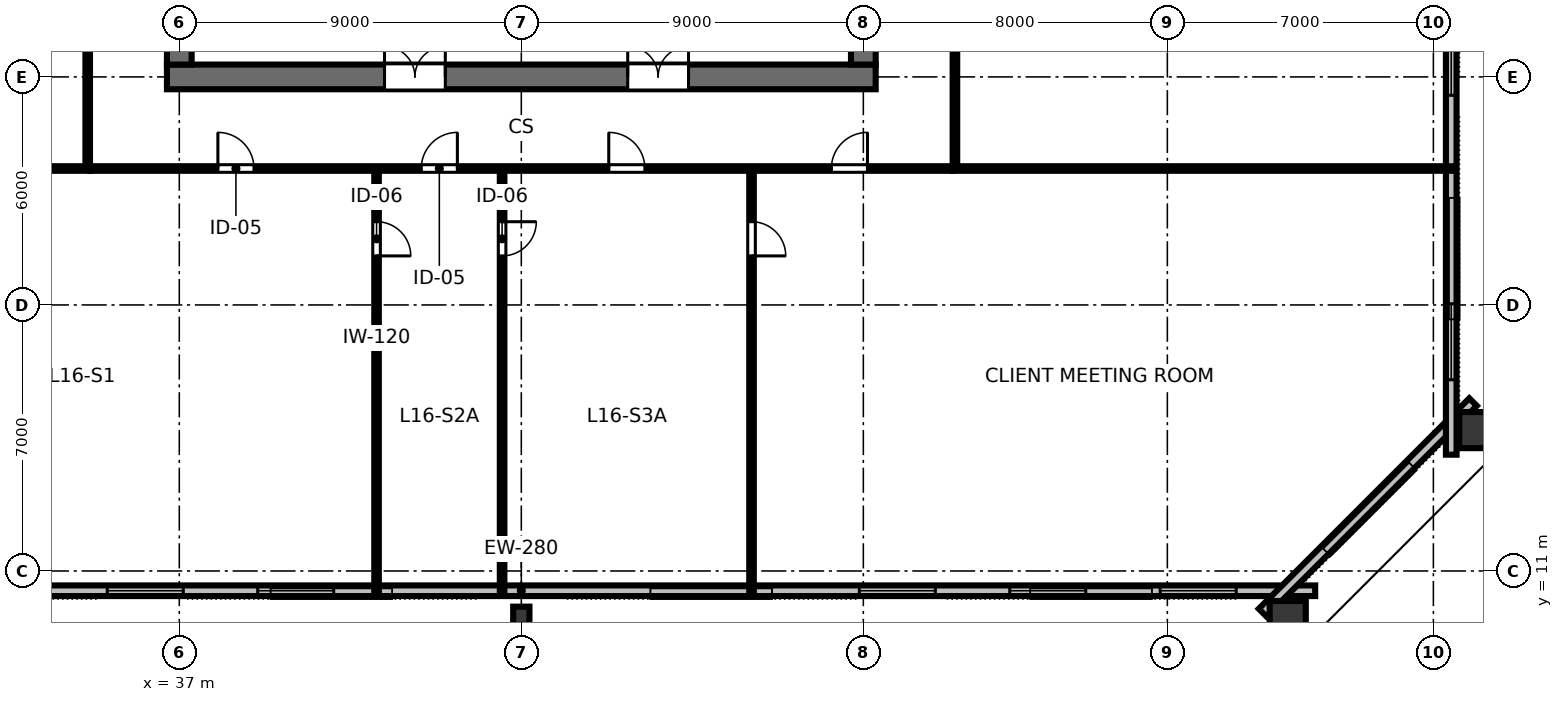
"""IFC4 building model, lengths in metres.
Left out: names, types, materials, properties, quantities, classifications, styles, units other than length and angle.
Written with IfcOpenShell. Run it as: python <this file> out.ifc"""

import sys

from ifc_helpers import new_model, si_unit, direction, frame, frame_2d, origin, origin_2d, place, context, subcontext, project, spatial, rectangle, hollow_rectangle, i_section, extrude, element, fill, save


model = new_model("IFC4")
c1 = context("Model", 3, precision=1e-05, world=origin(), true_north=direction((0.0, 1.0)))
c2 = subcontext(c1, "Body", "Model", "MODEL_VIEW")
j1 = project(units=[si_unit("LENGTHUNIT", "METRE"), si_unit("PLANEANGLEUNIT", "RADIAN")], contexts=[c1])
p1 = place(None, origin())
s1 = spatial("IfcSite", under=j1, at=p1, CompositionType="ELEMENT")
p2 = place(p1, origin())
s2 = spatial("IfcBuilding", under=s1, at=p2, CompositionType="ELEMENT")
p3 = place(p2, frame((0.0, 0.0, 64.0)))
s3 = spatial("IfcBuildingStorey", under=s2, at=p3, CompositionType="ELEMENT", Elevation=64.0)
p4 = place(p3, frame((36.675, 24.0, 0.0), z_axis=(0.0, 0.0, 1.0), x_axis=(1.0, 0.0, 0.0)))
e1 = element("IfcWall", 1, at=p4, inside=s3, PredefinedType="SHEAR", context=c2, shape_type="SweptSolid", body=[
    extrude(rectangle(XDim=18.65, YDim=0.65, at=frame_2d((9.325, 0.0))), origin(), (0.0, 0.0, 1.0), 3.36),
])
p5 = place(p4, frame((5.725, 0.0, 0.0)))
e2 = element("IfcOpeningElement", 2, at=p5, cuts=e1, PredefinedType="OPENING", context=c2, shape_type="SweptSolid", body=[
    extrude(rectangle(XDim=1.6, YDim=2.15, at=frame_2d((0.8, 1.075))), frame((0.0, 0.335, 0.0), z_axis=(0.0, -1.0, 0.0), x_axis=(1.0, 0.0, 0.0)), (0.0, 0.0, 1.0), 0.67),
])
p6 = place(p4, frame((12.125, 0.0, 0.0)))
e3 = element("IfcOpeningElement", 3, at=p6, cuts=e1, PredefinedType="OPENING", context=c2, shape_type="SweptSolid", body=[
    extrude(rectangle(XDim=1.6, YDim=2.15, at=frame_2d((0.8, 1.075))), frame((0.0, 0.335, 0.0), z_axis=(0.0, -1.0, 0.0), x_axis=(1.0, 0.0, 0.0)), (0.0, 0.0, 1.0), 0.67),
])
p7 = place(p3, frame((37.0, 24.325, 0.0), z_axis=(0.0, 0.0, 1.0), x_axis=(0.0, 1.0, 0.0)))
e4 = element("IfcWall", 4, at=p7, inside=s3, PredefinedType="SHEAR", context=c2, shape_type="SweptSolid", body=[
    extrude(rectangle(XDim=15.35, YDim=0.65, at=frame_2d((7.675, 0.0))), origin(), (0.0, 0.0, 1.0), 3.36),
])
p8 = place(p7, frame((5.2, 0.0, 0.0)))
e5 = element("IfcOpeningElement", 5, at=p8, cuts=e4, PredefinedType="OPENING", context=c2, shape_type="SweptSolid", body=[
    extrude(rectangle(XDim=1.15, YDim=2.15, at=frame_2d((0.575, 1.075))), frame((0.0, 0.335, 0.0), z_axis=(0.0, -1.0, 0.0), x_axis=(1.0, 0.0, 0.0)), (0.0, 0.0, 1.0), 0.67),
])
p9 = place(p3, frame((55.0, 24.325, 0.0), z_axis=(0.0, 0.0, 1.0), x_axis=(0.0, 1.0, 0.0)))
e6 = element("IfcWall", 6, at=p9, inside=s3, PredefinedType="SHEAR", context=c2, shape_type="SweptSolid", body=[
    extrude(rectangle(XDim=15.35, YDim=0.65, at=frame_2d((7.675, 0.0))), origin(), (0.0, 0.0, 1.0), 3.36),
])
p10 = place(p9, frame((5.2, 0.0, 0.0)))
e7 = element("IfcOpeningElement", 7, at=p10, cuts=e6, PredefinedType="OPENING", context=c2, shape_type="SweptSolid", body=[
    extrude(rectangle(XDim=1.15, YDim=2.15, at=frame_2d((0.575, 1.075))), frame((0.0, 0.335, 0.0), z_axis=(0.0, -1.0, 0.0), x_axis=(1.0, 0.0, 0.0)), (0.0, 0.0, 1.0), 0.67),
])
p11 = place(p3, frame((46.0, 9.82, 0.0), z_axis=(0.0, 0.0, 1.0), x_axis=(1.0, 0.0, 0.0)))
e8 = element("IfcColumn", 8, at=p11, inside=s3, PredefinedType="COLUMN", context=c2, shape_type="SweptSolid", body=[
    extrude(i_section(OverallWidth=0.428, OverallDepth=0.483, WebThickness=0.051, FlangeThickness=0.082, FilletRadius=0.025, at=origin_2d()), origin(), (0.0, 0.0, 1.0), 3.358),
])
for number, where, z_axis, x_axis in (
    (9, (66.168, 9.635, 0.0), (0.0, 0.0, 1.0), (1.0, 0.0, 0.0)),
    (10, (71.256, 14.707, 0.0), (0.0, 0.0, 1.0), (0.0, 1.0, 0.0)),
):
    element("IfcColumn", number, at=place(p3, frame(where, z_axis=z_axis, x_axis=x_axis)), inside=s3, PredefinedType="COLUMN", context=c2, shape_type="SweptSolid", body=[
        extrude(hollow_rectangle(XDim=0.95, YDim=1.15, WallThickness=0.06, at=origin_2d()), origin(), (0.0, 0.0, 1.0), 3.358),
    ])
p12 = place(p3, frame((25.11, 10.48, 0.0), z_axis=(0.0, 0.0, 1.0), x_axis=(1.0, 0.0, 0.0)))
e11 = element("IfcWall", 11, at=p12, inside=s3, PredefinedType="STANDARD", context=c2, shape_type="SweptSolid", body=[
    extrude(rectangle(XDim=41.78, YDim=0.28, at=frame_2d((20.89, 0.0))), origin(), (0.0, 0.0, 1.0), 3.36),
])
p13 = place(p12, frame((2.079, 0.0, 0.8)))
e12 = element("IfcOpeningElement", 12, at=p13, cuts=e11, PredefinedType="OPENING", context=c2, shape_type="SweptSolid", body=[
    extrude(rectangle(XDim=2.0, YDim=1.95, at=frame_2d((1.0, 0.975))), frame((0.0, 0.15, 0.0), z_axis=(0.0, -1.0, 0.0), x_axis=(1.0, 0.0, 0.0)), (0.0, 0.0, 1.0), 0.3),
])
p14 = place(p12, frame((6.037, 0.0, 0.8)))
e13 = element("IfcOpeningElement", 13, at=p14, cuts=e11, PredefinedType="OPENING", context=c2, shape_type="SweptSolid", body=[
    extrude(rectangle(XDim=2.0, YDim=1.95, at=frame_2d((1.0, 0.975))), frame((0.0, 0.15, 0.0), z_axis=(0.0, -1.0, 0.0), x_axis=(1.0, 0.0, 0.0)), (0.0, 0.0, 1.0), 0.3),
])
p15 = place(p12, frame((9.995, 0.0, 0.8)))
e14 = element("IfcOpeningElement", 14, at=p15, cuts=e11, PredefinedType="OPENING", context=c2, shape_type="SweptSolid", body=[
    extrude(rectangle(XDim=2.0, YDim=1.95, at=frame_2d((1.0, 0.975))), frame((0.0, 0.15, 0.0), z_axis=(0.0, -1.0, 0.0), x_axis=(1.0, 0.0, 0.0)), (0.0, 0.0, 1.0), 0.3),
])
p16 = place(p12, frame((13.953, 0.0, 0.8)))
e15 = element("IfcOpeningElement", 15, at=p16, cuts=e11, PredefinedType="OPENING", context=c2, shape_type="SweptSolid", body=[
    extrude(rectangle(XDim=2.0, YDim=1.95, at=frame_2d((1.0, 0.975))), frame((0.0, 0.15, 0.0), z_axis=(0.0, -1.0, 0.0), x_axis=(1.0, 0.0, 0.0)), (0.0, 0.0, 1.0), 0.3),
])
p17 = place(p12, frame((29.785, 0.0, 0.8)))
e16 = element("IfcOpeningElement", 16, at=p17, cuts=e11, PredefinedType="OPENING", context=c2, shape_type="SweptSolid", body=[
    extrude(rectangle(XDim=2.0, YDim=1.95, at=frame_2d((1.0, 0.975))), frame((0.0, 0.15, 0.0), z_axis=(0.0, -1.0, 0.0), x_axis=(1.0, 0.0, 0.0)), (0.0, 0.0, 1.0), 0.3),
])
p18 = place(p12, frame((33.743, 0.0, 0.8)))
e17 = element("IfcOpeningElement", 17, at=p18, cuts=e11, PredefinedType="OPENING", context=c2, shape_type="SweptSolid", body=[
    extrude(rectangle(XDim=2.0, YDim=1.95, at=frame_2d((1.0, 0.975))), frame((0.0, 0.15, 0.0), z_axis=(0.0, -1.0, 0.0), x_axis=(1.0, 0.0, 0.0)), (0.0, 0.0, 1.0), 0.3),
])
p19 = place(p12, frame((37.701, 0.0, 0.8)))
e18 = element("IfcOpeningElement", 18, at=p19, cuts=e11, PredefinedType="OPENING", context=c2, shape_type="SweptSolid", body=[
    extrude(rectangle(XDim=2.0, YDim=1.95, at=frame_2d((1.0, 0.975))), frame((0.0, 0.15, 0.0), z_axis=(0.0, -1.0, 0.0), x_axis=(1.0, 0.0, 0.0)), (0.0, 0.0, 1.0), 0.3),
])
p20 = place(p3, frame((65.504, 9.906, 0.0), z_axis=(0.0, 0.0, 1.0), x_axis=(0.707106781187, 0.707106781187, 0.0)))
e19 = element("IfcWall", 19, at=p20, inside=s3, PredefinedType="STANDARD", context=c2, shape_type="SweptSolid", body=[
    extrude(rectangle(XDim=7.834, YDim=0.28, at=frame_2d((3.917, 0.0))), origin(), (0.0, 0.0, 1.0), 3.36),
])
p21 = place(p3, frame((70.47, 14.06, 0.0), z_axis=(0.0, 0.0, 1.0), x_axis=(0.0, 1.0, 0.0)))
e20 = element("IfcWall", 20, at=p21, inside=s3, PredefinedType="STANDARD", context=c2, shape_type="SweptSolid", body=[
    extrude(rectangle(XDim=35.88, YDim=0.28, at=frame_2d((17.94, 0.0))), origin(), (0.0, 0.0, 1.0), 3.36),
])
p22 = place(p21, frame((19.29, 0.0, 0.0)))
e21 = element("IfcOpeningElement", 21, at=p22, cuts=e20, PredefinedType="OPENING", context=c2, shape_type="SweptSolid", body=[
    extrude(rectangle(XDim=1.4, YDim=2.15, at=frame_2d((0.7, 1.075))), frame((0.0, 0.15, 0.0), z_axis=(0.0, -1.0, 0.0), x_axis=(1.0, 0.0, 0.0)), (0.0, 0.0, 1.0), 0.3),
])
p23 = place(p21, frame((1.971, 0.0, 0.8)))
e22 = element("IfcOpeningElement", 22, at=p23, cuts=e20, PredefinedType="OPENING", context=c2, shape_type="SweptSolid", body=[
    extrude(rectangle(XDim=2.0, YDim=1.95, at=frame_2d((1.0, 0.975))), frame((0.0, 0.15, 0.0), z_axis=(0.0, -1.0, 0.0), x_axis=(1.0, 0.0, 0.0)), (0.0, 0.0, 1.0), 0.3),
])
p24 = place(p21, frame((9.456, 0.0, 0.8)))
e23 = element("IfcOpeningElement", 23, at=p24, cuts=e20, PredefinedType="OPENING", context=c2, shape_type="SweptSolid", body=[
    extrude(rectangle(XDim=2.0, YDim=1.95, at=frame_2d((1.0, 0.975))), frame((0.0, 0.15, 0.0), z_axis=(0.0, -1.0, 0.0), x_axis=(1.0, 0.0, 0.0)), (0.0, 0.0, 1.0), 0.3),
])
p25 = place(p21, frame((24.424, 0.0, 0.8)))
e24 = element("IfcOpeningElement", 24, at=p25, cuts=e20, PredefinedType="OPENING", context=c2, shape_type="SweptSolid", body=[
    extrude(rectangle(XDim=2.0, YDim=1.95, at=frame_2d((1.0, 0.975))), frame((0.0, 0.15, 0.0), z_axis=(0.0, -1.0, 0.0), x_axis=(1.0, 0.0, 0.0)), (0.0, 0.0, 1.0), 0.3),
])
p26 = place(p21, frame((31.909, 0.0, 0.8)))
e25 = element("IfcOpeningElement", 25, at=p26, cuts=e20, PredefinedType="OPENING", context=c2, shape_type="SweptSolid", body=[
    extrude(rectangle(XDim=2.0, YDim=1.95, at=frame_2d((1.0, 0.975))), frame((0.0, 0.15, 0.0), z_axis=(0.0, -1.0, 0.0), x_axis=(1.0, 0.0, 0.0)), (0.0, 0.0, 1.0), 0.3),
])
p27 = place(p3, frame((42.191, 21.59, 0.0), z_axis=(0.0, 0.0, 1.0), x_axis=(0.0, -1.0, 0.0)))
e26 = element("IfcWall", 26, at=p27, inside=s3, PredefinedType="PARTITIONING", context=c2, shape_type="SweptSolid", body=[
    extrude(rectangle(XDim=11.11, YDim=0.12, at=frame_2d((5.555, 0.0))), origin(), (0.0, 0.0, 1.0), 2.64),
])
p28 = place(p27, frame((1.4, 0.0, 0.0)))
e27 = element("IfcOpeningElement", 27, at=p28, cuts=e26, PredefinedType="OPENING", context=c2, shape_type="SweptSolid", body=[
    extrude(rectangle(XDim=0.9, YDim=2.15, at=frame_2d((0.45, 1.075))), frame((0.0, 0.07, 0.0), z_axis=(0.0, -1.0, 0.0), x_axis=(1.0, 0.0, 0.0)), (0.0, 0.0, 1.0), 0.14),
])
p29 = place(p3, frame((45.494, 21.59, 0.0), z_axis=(0.0, 0.0, 1.0), x_axis=(0.0, -1.0, 0.0)))
e28 = element("IfcWall", 28, at=p29, inside=s3, PredefinedType="PARTITIONING", context=c2, shape_type="SweptSolid", body=[
    extrude(rectangle(XDim=11.11, YDim=0.12, at=frame_2d((5.555, 0.0))), origin(), (0.0, 0.0, 1.0), 2.64),
])
p30 = place(p29, frame((1.4, 0.0, 0.0)))
e29 = element("IfcOpeningElement", 29, at=p30, cuts=e28, PredefinedType="OPENING", context=c2, shape_type="SweptSolid", body=[
    extrude(rectangle(XDim=0.9, YDim=2.15, at=frame_2d((0.45, 1.075))), frame((0.0, 0.07, 0.0), z_axis=(0.0, -1.0, 0.0), x_axis=(1.0, 0.0, 0.0)), (0.0, 0.0, 1.0), 0.14),
])
p31 = place(p3, frame((52.058, 21.59, 0.0), z_axis=(0.0, 0.0, 1.0), x_axis=(0.0, -1.0, 0.0)))
e30 = element("IfcWall", 30, at=p31, inside=s3, PredefinedType="PARTITIONING", context=c2, shape_type="SweptSolid", body=[
    extrude(rectangle(XDim=11.11, YDim=0.12, at=frame_2d((5.555, 0.0))), origin(), (0.0, 0.0, 1.0), 2.64),
])
p32 = place(p31, frame((1.4, 0.0, 0.0)))
e31 = element("IfcOpeningElement", 31, at=p32, cuts=e30, PredefinedType="OPENING", context=c2, shape_type="SweptSolid", body=[
    extrude(rectangle(XDim=0.9, YDim=2.15, at=frame_2d((0.45, 1.075))), frame((0.0, 0.07, 0.0), z_axis=(0.0, -1.0, 0.0), x_axis=(1.0, 0.0, 0.0)), (0.0, 0.0, 1.0), 0.14),
])
p33 = place(p3, frame((34.65, 21.59, 0.0), z_axis=(0.0, 0.0, 1.0), x_axis=(1.0, 0.0, 0.0)))
e32 = element("IfcWall", 32, at=p33, inside=s3, PredefinedType="PARTITIONING", context=c2, shape_type="SweptSolid", body=[
    extrude(rectangle(XDim=22.7, YDim=0.12, at=frame_2d((11.35, 0.0))), origin(), (0.0, 0.0, 1.0), 2.64),
])
p34 = place(p33, frame((3.365, 0.0, 0.0)))
e33 = element("IfcOpeningElement", 33, at=p34, cuts=e32, PredefinedType="OPENING", context=c2, shape_type="SweptSolid", body=[
    extrude(rectangle(XDim=0.95, YDim=2.15, at=frame_2d((0.475, 1.075))), frame((0.0, 0.07, 0.0), z_axis=(0.0, -1.0, 0.0), x_axis=(1.0, 0.0, 0.0)), (0.0, 0.0, 1.0), 0.14),
])
p35 = place(p33, frame((8.718, 0.0, 0.0)))
e34 = element("IfcOpeningElement", 34, at=p35, cuts=e32, PredefinedType="OPENING", context=c2, shape_type="SweptSolid", body=[
    extrude(rectangle(XDim=0.95, YDim=2.15, at=frame_2d((0.475, 1.075))), frame((0.0, 0.07, 0.0), z_axis=(0.0, -1.0, 0.0), x_axis=(1.0, 0.0, 0.0)), (0.0, 0.0, 1.0), 0.14),
])
p36 = place(p33, frame((13.651, 0.0, 0.0)))
e35 = element("IfcOpeningElement", 35, at=p36, cuts=e32, PredefinedType="OPENING", context=c2, shape_type="SweptSolid", body=[
    extrude(rectangle(XDim=0.95, YDim=2.15, at=frame_2d((0.475, 1.075))), frame((0.0, 0.07, 0.0), z_axis=(0.0, -1.0, 0.0), x_axis=(1.0, 0.0, 0.0)), (0.0, 0.0, 1.0), 0.14),
])
p37 = place(p33, frame((19.509, 0.0, 0.0)))
e36 = element("IfcOpeningElement", 36, at=p37, cuts=e32, PredefinedType="OPENING", context=c2, shape_type="SweptSolid", body=[
    extrude(rectangle(XDim=0.95, YDim=2.15, at=frame_2d((0.475, 1.075))), frame((0.0, 0.07, 0.0), z_axis=(0.0, -1.0, 0.0), x_axis=(1.0, 0.0, 0.0)), (0.0, 0.0, 1.0), 0.14),
])
p38 = place(p3, frame((34.59, 21.65, 0.0), z_axis=(0.0, 0.0, 1.0), x_axis=(0.0, 1.0, 0.0)))
e37 = element("IfcWall", 37, at=p38, inside=s3, PredefinedType="PARTITIONING", context=c2, shape_type="SweptSolid", body=[
    extrude(rectangle(XDim=20.7, YDim=0.12, at=frame_2d((10.35, 0.0))), origin(), (0.0, 0.0, 1.0), 2.64),
])
p39 = place(p38, frame((6.696, 0.0, 0.0)))
e38 = element("IfcOpeningElement", 38, at=p39, cuts=e37, PredefinedType="OPENING", context=c2, shape_type="SweptSolid", body=[
    extrude(rectangle(XDim=0.95, YDim=2.15, at=frame_2d((0.475, 1.075))), frame((0.0, 0.07, 0.0), z_axis=(0.0, -1.0, 0.0), x_axis=(1.0, 0.0, 0.0)), (0.0, 0.0, 1.0), 0.14),
])
p40 = place(p38, frame((16.846, 0.0, 0.0)))
e39 = element("IfcOpeningElement", 39, at=p40, cuts=e37, PredefinedType="OPENING", context=c2, shape_type="SweptSolid", body=[
    extrude(rectangle(XDim=0.95, YDim=2.15, at=frame_2d((0.475, 1.075))), frame((0.0, 0.07, 0.0), z_axis=(0.0, -1.0, 0.0), x_axis=(1.0, 0.0, 0.0)), (0.0, 0.0, 1.0), 0.14),
])
p41 = place(p3, frame((57.41, 21.65, 0.0), z_axis=(0.0, 0.0, 1.0), x_axis=(0.0, 1.0, 0.0)))
e40 = element("IfcWall", 40, at=p41, inside=s3, PredefinedType="PARTITIONING", context=c2, shape_type="SweptSolid", body=[
    extrude(rectangle(XDim=20.7, YDim=0.12, at=frame_2d((10.35, 0.0))), origin(), (0.0, 0.0, 1.0), 2.64),
])
p42 = place(p41, frame((3.502, 0.0, 0.0)))
e41 = element("IfcOpeningElement", 41, at=p42, cuts=e40, PredefinedType="OPENING", context=c2, shape_type="SweptSolid", body=[
    extrude(rectangle(XDim=0.95, YDim=2.15, at=frame_2d((0.475, 1.075))), frame((0.0, 0.07, 0.0), z_axis=(0.0, -1.0, 0.0), x_axis=(1.0, 0.0, 0.0)), (0.0, 0.0, 1.0), 0.14),
])
p43 = place(p41, frame((13.652, 0.0, 0.0)))
e42 = element("IfcOpeningElement", 42, at=p43, cuts=e40, PredefinedType="OPENING", context=c2, shape_type="SweptSolid", body=[
    extrude(rectangle(XDim=0.95, YDim=2.15, at=frame_2d((0.475, 1.075))), frame((0.0, 0.07, 0.0), z_axis=(0.0, -1.0, 0.0), x_axis=(1.0, 0.0, 0.0)), (0.0, 0.0, 1.0), 0.14),
])
for number, where, z_axis, x_axis in (
    (43, (34.65, 21.59, 0.0), (0.0, 0.0, 1.0), (-1.0, 0.0, 0.0)),
    (44, (57.35, 21.59, 0.0), (0.0, 0.0, 1.0), (1.0, 0.0, 0.0)),
):
    element("IfcWall", number, at=place(p3, frame(where, z_axis=z_axis, x_axis=x_axis)), inside=s3, PredefinedType="PARTITIONING", context=c2, shape_type="SweptSolid", body=[
        extrude(rectangle(XDim=13.12, YDim=0.12, at=frame_2d((6.56, 0.0))), origin(), (0.0, 0.0, 1.0), 2.64),
    ])
p44 = place(p15, origin())
e45 = element("IfcWindow", 45, at=p44, inside=s3, PartitioningType="SINGLE_PANEL", PredefinedType="WINDOW", context=c2, shape_type="SweptSolid", body=[
    extrude(rectangle(XDim=2.0, YDim=1.95, at=frame_2d((1.0, 0.975))), frame((0.0, 0.03, 0.0), z_axis=(0.0, -1.0, 0.0), x_axis=(1.0, 0.0, 0.0)), (0.0, 0.0, 1.0), 0.06),
])
fill(e14, e45)
p45 = place(p16, origin())
e46 = element("IfcWindow", 46, at=p45, inside=s3, PartitioningType="SINGLE_PANEL", PredefinedType="WINDOW", context=c2, shape_type="SweptSolid", body=[
    extrude(rectangle(XDim=2.0, YDim=1.95, at=frame_2d((1.0, 0.975))), frame((0.0, 0.03, 0.0), z_axis=(0.0, -1.0, 0.0), x_axis=(1.0, 0.0, 0.0)), (0.0, 0.0, 1.0), 0.06),
])
fill(e15, e46)
p46 = place(p17, origin())
e47 = element("IfcWindow", 47, at=p46, inside=s3, PartitioningType="SINGLE_PANEL", PredefinedType="WINDOW", context=c2, shape_type="SweptSolid", body=[
    extrude(rectangle(XDim=2.0, YDim=1.95, at=frame_2d((1.0, 0.975))), frame((0.0, 0.03, 0.0), z_axis=(0.0, -1.0, 0.0), x_axis=(1.0, 0.0, 0.0)), (0.0, 0.0, 1.0), 0.06),
])
fill(e16, e47)
p47 = place(p18, origin())
e48 = element("IfcWindow", 48, at=p47, inside=s3, PartitioningType="SINGLE_PANEL", PredefinedType="WINDOW", context=c2, shape_type="SweptSolid", body=[
    extrude(rectangle(XDim=2.0, YDim=1.95, at=frame_2d((1.0, 0.975))), frame((0.0, 0.03, 0.0), z_axis=(0.0, -1.0, 0.0), x_axis=(1.0, 0.0, 0.0)), (0.0, 0.0, 1.0), 0.06),
])
fill(e17, e48)
p48 = place(p19, origin())
e49 = element("IfcWindow", 49, at=p48, inside=s3, PartitioningType="SINGLE_PANEL", PredefinedType="WINDOW", context=c2, shape_type="SweptSolid", body=[
    extrude(rectangle(XDim=2.0, YDim=1.95, at=frame_2d((1.0, 0.975))), frame((0.0, 0.03, 0.0), z_axis=(0.0, -1.0, 0.0), x_axis=(1.0, 0.0, 0.0)), (0.0, 0.0, 1.0), 0.06),
])
fill(e18, e49)
p49 = place(p23, origin())
e50 = element("IfcWindow", 50, at=p49, inside=s3, PartitioningType="SINGLE_PANEL", PredefinedType="WINDOW", context=c2, shape_type="SweptSolid", body=[
    extrude(rectangle(XDim=2.0, YDim=1.95, at=frame_2d((1.0, 0.975))), frame((0.0, 0.03, 0.0), z_axis=(0.0, -1.0, 0.0), x_axis=(1.0, 0.0, 0.0)), (0.0, 0.0, 1.0), 0.06),
])
fill(e22, e50)
p50 = place(p24, origin())
e51 = element("IfcWindow", 51, at=p50, inside=s3, PartitioningType="SINGLE_PANEL", PredefinedType="WINDOW", context=c2, shape_type="SweptSolid", body=[
    extrude(rectangle(XDim=2.0, YDim=1.95, at=frame_2d((1.0, 0.975))), frame((0.0, 0.03, 0.0), z_axis=(0.0, -1.0, 0.0), x_axis=(1.0, 0.0, 0.0)), (0.0, 0.0, 1.0), 0.06),
])
fill(e23, e51)
p51 = place(p5, origin())
e52 = element("IfcDoor", 52, at=p51, inside=s3, OperationType="DOUBLE_DOOR_SINGLE_SWING", PredefinedType="DOOR", context=c2, shape_type="SweptSolid", body=[
    extrude(rectangle(XDim=1.6, YDim=2.15, at=frame_2d((0.8, 1.075))), frame((0.0, 0.025, 0.0), z_axis=(0.0, -1.0, 0.0), x_axis=(1.0, 0.0, 0.0)), (0.0, 0.0, 1.0), 0.05),
])
fill(e2, e52)
p52 = place(p6, origin())
e53 = element("IfcDoor", 53, at=p52, inside=s3, OperationType="DOUBLE_DOOR_SINGLE_SWING", PredefinedType="DOOR", context=c2, shape_type="SweptSolid", body=[
    extrude(rectangle(XDim=1.6, YDim=2.15, at=frame_2d((0.8, 1.075))), frame((0.0, 0.025, 0.0), z_axis=(0.0, -1.0, 0.0), x_axis=(1.0, 0.0, 0.0)), (0.0, 0.0, 1.0), 0.05),
])
fill(e3, e53)
p53 = place(p28, origin())
e54 = element("IfcDoor", 54, at=p53, inside=s3, OperationType="SINGLE_SWING_RIGHT", PredefinedType="DOOR", context=c2, shape_type="SweptSolid", body=[
    extrude(rectangle(XDim=0.9, YDim=2.15, at=frame_2d((0.45, 1.075))), frame((0.0, 0.025, 0.0), z_axis=(0.0, -1.0, 0.0), x_axis=(1.0, 0.0, 0.0)), (0.0, 0.0, 1.0), 0.05),
])
fill(e27, e54)
p54 = place(p30, origin())
e55 = element("IfcDoor", 55, at=p54, inside=s3, OperationType="SINGLE_SWING_LEFT", PredefinedType="DOOR", context=c2, shape_type="SweptSolid", body=[
    extrude(rectangle(XDim=0.9, YDim=2.15, at=frame_2d((0.45, 1.075))), frame((0.0, 0.025, 0.0), z_axis=(0.0, -1.0, 0.0), x_axis=(1.0, 0.0, 0.0)), (0.0, 0.0, 1.0), 0.05),
])
fill(e29, e55)
p55 = place(p32, origin())
e56 = element("IfcDoor", 56, at=p55, inside=s3, OperationType="SINGLE_SWING_RIGHT", PredefinedType="DOOR", context=c2, shape_type="SweptSolid", body=[
    extrude(rectangle(XDim=0.9, YDim=2.15, at=frame_2d((0.45, 1.075))), frame((0.0, 0.025, 0.0), z_axis=(0.0, -1.0, 0.0), x_axis=(1.0, 0.0, 0.0)), (0.0, 0.0, 1.0), 0.05),
])
fill(e31, e56)
p56 = place(p34, origin())
e57 = element("IfcDoor", 57, at=p56, inside=s3, OperationType="SINGLE_SWING_LEFT", PredefinedType="DOOR", context=c2, shape_type="SweptSolid", body=[
    extrude(rectangle(XDim=0.95, YDim=2.15, at=frame_2d((0.475, 1.075))), frame((0.0, 0.025, 0.0), z_axis=(0.0, -1.0, 0.0), x_axis=(1.0, 0.0, 0.0)), (0.0, 0.0, 1.0), 0.05),
])
fill(e33, e57)
p57 = place(p35, origin())
e58 = element("IfcDoor", 58, at=p57, inside=s3, OperationType="SINGLE_SWING_RIGHT", PredefinedType="DOOR", context=c2, shape_type="SweptSolid", body=[
    extrude(rectangle(XDim=0.95, YDim=2.15, at=frame_2d((0.475, 1.075))), frame((0.0, 0.025, 0.0), z_axis=(0.0, -1.0, 0.0), x_axis=(1.0, 0.0, 0.0)), (0.0, 0.0, 1.0), 0.05),
])
fill(e34, e58)
p58 = place(p36, origin())
e59 = element("IfcDoor", 59, at=p58, inside=s3, OperationType="SINGLE_SWING_LEFT", PredefinedType="DOOR", context=c2, shape_type="SweptSolid", body=[
    extrude(rectangle(XDim=0.95, YDim=2.15, at=frame_2d((0.475, 1.075))), frame((0.0, 0.025, 0.0), z_axis=(0.0, -1.0, 0.0), x_axis=(1.0, 0.0, 0.0)), (0.0, 0.0, 1.0), 0.05),
])
fill(e35, e59)
p59 = place(p37, origin())
e60 = element("IfcDoor", 60, at=p59, inside=s3, OperationType="SINGLE_SWING_RIGHT", PredefinedType="DOOR", context=c2, shape_type="SweptSolid", body=[
    extrude(rectangle(XDim=0.95, YDim=2.15, at=frame_2d((0.475, 1.075))), frame((0.0, 0.025, 0.0), z_axis=(0.0, -1.0, 0.0), x_axis=(1.0, 0.0, 0.0)), (0.0, 0.0, 1.0), 0.05),
])
fill(e36, e60)
save(model, sys.argv[1])
